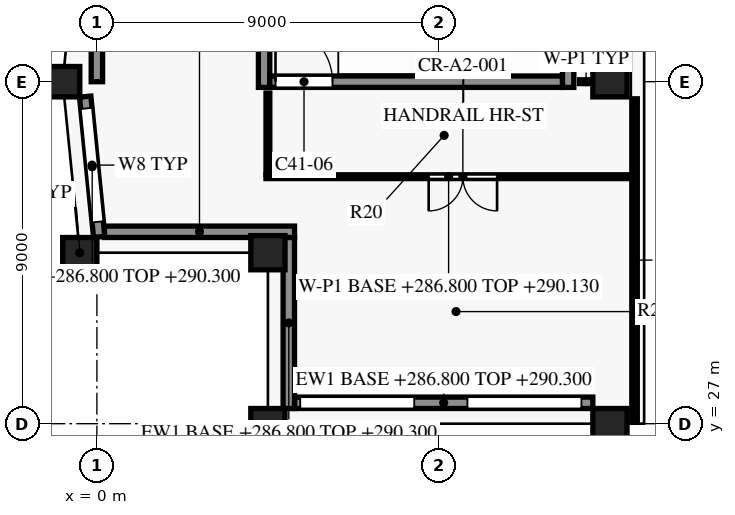
"""IFC4 building model, lengths in metres.
Left out: names, types, materials, properties, quantities, classifications, styles, units other than length and angle.
Written with IfcOpenShell. Run it as: python <this file> out.ifc"""

import sys

from ifc_helpers import new_model, si_unit, direction, frame, frame_2d, origin, origin_2d, place, context, subcontext, project, spatial, rectangle, extrude, element, fill, save


model = new_model("IFC4")
c1 = context("Model", 3, precision=1e-05, world=origin(), true_north=direction((0.0, 1.0)))
c2 = subcontext(c1, "Body", "Model", "MODEL_VIEW")
j1 = project(units=[si_unit("LENGTHUNIT", "METRE"), si_unit("PLANEANGLEUNIT", "RADIAN")], contexts=[c1])
p1 = place(None, origin())
s1 = spatial("IfcSite", under=j1, at=p1, CompositionType="ELEMENT")
p2 = place(p1, origin())
s2 = spatial("IfcBuilding", under=s1, at=p2, CompositionType="ELEMENT")
p3 = place(p2, frame((0.0, 0.0, 286.8)))
s3 = spatial("IfcBuildingStorey", under=s2, at=p3, CompositionType="ELEMENT", Elevation=286.8)
for number, where, z_axis, x_axis in (
    (1, (4.5, 27.0, 0.0), (0.0, 0.0, 1.0), (1.0, 0.0, 0.0)),
    (2, (13.5, 27.0, 0.0), (0.0, 0.0, 1.0), (1.0, 0.0, 0.0)),
    (3, (13.5, 36.0, 0.0), (0.0, 0.0, 1.0), (1.0, 0.0, 0.0)),
    (4, (-0.9, 36.0, 0.0), (0.0, 0.0, 1.0), (0.0, -1.0, 0.0)),
    (5, (-0.45, 31.5, 0.0), (0.0, 0.0, 1.0), (0.1, -0.995, 0.0)),
):
    element("IfcColumn", number, at=place(p3, frame(where, z_axis=z_axis, x_axis=x_axis)), inside=s3, PredefinedType="COLUMN", context=c2, shape_type="SweptSolid", body=[
        extrude(rectangle(XDim=0.9, YDim=0.8, at=origin_2d()), origin(), (0.0, 0.0, 1.0), 4.0),
    ])
p4 = place(p3, frame((4.5, 31.5, 0.0), z_axis=(0.0, 0.0, 1.0), x_axis=(1.0, 0.0, 0.0)))
e6 = element("IfcColumn", 6, at=p4, inside=s3, PredefinedType="COLUMN", context=c2, shape_type="SweptSolid", body=[
    extrude(rectangle(XDim=0.9, YDim=0.9, at=origin_2d()), origin(), (0.0, 0.0, 1.0), 4.0),
])
p5 = place(p3, frame((13.05, 27.55, 0.0), z_axis=(0.0, 0.0, 1.0), x_axis=(-1.0, 0.0, 0.0)))
e7 = element("IfcWall", 7, at=p5, inside=s3, PredefinedType="SOLIDWALL", context=c2, shape_type="SweptSolid", body=[
    extrude(rectangle(XDim=7.85, YDim=0.3, at=frame_2d((3.925, 0.0))), origin(), (0.0, 0.0, 1.0), 3.5),
])
p6 = place(p5, frame((0.3, 0.0, 0.9)))
e8 = element("IfcOpeningElement", 8, at=p6, cuts=e7, PredefinedType="OPENING", context=c2, shape_type="SweptSolid", body=[
    extrude(rectangle(XDim=3.0, YDim=1.8, at=frame_2d((1.5, 0.9))), frame((0.0, 0.16, 0.0), z_axis=(0.0, -1.0, 0.0), x_axis=(1.0, 0.0, 0.0)), (0.0, 0.0, 1.0), 0.32),
])
p7 = place(p5, frame((4.7, 0.0, 0.9)))
e9 = element("IfcOpeningElement", 9, at=p7, cuts=e7, PredefinedType="OPENING", context=c2, shape_type="SweptSolid", body=[
    extrude(rectangle(XDim=3.0, YDim=1.8, at=frame_2d((1.5, 0.9))), frame((0.0, 0.16, 0.0), z_axis=(0.0, -1.0, 0.0), x_axis=(1.0, 0.0, 0.0)), (0.0, 0.0, 1.0), 0.32),
])
p8 = place(p3, frame((0.061, 31.915, 0.0), z_axis=(0.0, 0.0, 1.0), x_axis=(-0.099549320092, 0.995032629048, 0.0)))
e10 = element("IfcWall", 10, at=p8, inside=s3, PredefinedType="SOLIDWALL", context=c2, shape_type="SweptSolid", body=[
    extrude(rectangle(XDim=3.71, YDim=0.3, at=frame_2d((1.855, 0.0))), origin(), (0.0, 0.0, 1.0), 3.5),
])
p9 = place(p8, frame((0.399, 0.0, 0.9)))
e11 = element("IfcOpeningElement", 11, at=p9, cuts=e10, PredefinedType="OPENING", context=c2, shape_type="SweptSolid", body=[
    extrude(rectangle(XDim=3.0, YDim=1.8, at=frame_2d((1.5, 0.9))), frame((0.0, 0.16, 0.0), z_axis=(0.0, -1.0, 0.0), x_axis=(1.0, 0.0, 0.0)), (0.0, 0.0, 1.0), 0.32),
])
p10 = place(p3, frame((5.2, 32.05, 0.0), z_axis=(0.0, 0.0, 1.0), x_axis=(-1.0, 0.0, 0.0)))
e12 = element("IfcWall", 12, at=p10, inside=s3, PredefinedType="SOLIDWALL", context=c2, shape_type="SweptSolid", body=[
    extrude(rectangle(XDim=5.0, YDim=0.3, at=frame_2d((2.5, 0.0))), origin(), (0.0, 0.0, 1.0), 3.5),
])
p11 = place(p3, frame((5.05, 27.4, 0.0), z_axis=(0.0, 0.0, 1.0), x_axis=(0.0, 1.0, 0.0)))
e13 = element("IfcWall", 13, at=p11, inside=s3, PredefinedType="SOLIDWALL", context=c2, shape_type="SweptSolid", body=[
    extrude(rectangle(XDim=4.502, YDim=0.3, at=frame_2d((2.251, 0.0))), origin(), (0.0, 0.0, 1.0), 3.5),
])
p12 = place(p3, frame((4.55, 36.0, 0.0), z_axis=(0.0, 0.0, 1.0), x_axis=(1.0, 0.0, 0.0)))
e14 = element("IfcWall", 14, at=p12, inside=s3, PredefinedType="SHEAR", context=c2, shape_type="SweptSolid", body=[
    extrude(rectangle(XDim=7.7, YDim=0.3, at=frame_2d((3.85, 0.0))), origin(), (0.0, 0.0, 1.0), 3.7),
])
p13 = place(p12, frame((0.15, 0.0, 0.0)))
e15 = element("IfcOpeningElement", 15, at=p13, cuts=e14, PredefinedType="OPENING", context=c2, shape_type="SweptSolid", body=[
    extrude(rectangle(XDim=1.5, YDim=2.2, at=frame_2d((0.75, 1.1))), frame((0.0, 0.16, 0.0), z_axis=(0.0, -1.0, 0.0), x_axis=(1.0, 0.0, 0.0)), (0.0, 0.0, 1.0), 0.32),
])
p14 = place(p3, frame((0.0, 36.0, 0.0), z_axis=(0.0, 0.0, 1.0), x_axis=(0.0, 1.0, 0.0)))
e16 = element("IfcWall", 16, at=p14, inside=s3, PredefinedType="SHEAR", context=c2, shape_type="SweptSolid", body=[
    extrude(rectangle(XDim=7.275, YDim=0.3, at=frame_2d((3.637, 0.0))), origin(), (0.0, 0.0, 1.0), 3.7),
])
p15 = place(p3, frame((4.4, 35.85, 0.0), z_axis=(0.0, 0.0, 1.0), x_axis=(0.0, 1.0, 0.0)))
e17 = element("IfcWall", 17, at=p15, inside=s3, PredefinedType="SHEAR", context=c2, shape_type="SweptSolid", body=[
    extrude(rectangle(XDim=3.75, YDim=0.3, at=frame_2d((1.875, 0.0))), origin(), (0.0, 0.0, 1.0), 3.7),
])
p16 = place(p3, frame((12.4, 35.85, 0.0), z_axis=(0.0, 0.0, 1.0), x_axis=(0.0, 1.0, 0.0)))
e18 = element("IfcWall", 18, at=p16, inside=s3, PredefinedType="SHEAR", context=c2, shape_type="SweptSolid", body=[
    extrude(rectangle(XDim=3.9, YDim=0.3, at=frame_2d((1.95, 0.0))), origin(), (0.0, 0.0, 1.0), 3.7),
])
p17 = place(p3, frame((14.06, 33.5, 0.0), z_axis=(0.0, 0.0, 1.0), x_axis=(-1.0, 0.0, 0.0)))
e19 = element("IfcWall", 19, at=p17, inside=s3, PredefinedType="PARTITIONING", context=c2, shape_type="SweptSolid", body=[
    extrude(rectangle(XDim=9.61, YDim=0.1, at=frame_2d((4.805, 0.0))), origin(), (0.0, 0.0, 1.0), 3.33),
])
p18 = place(p17, frame((3.53, 0.0, 0.0)))
e20 = element("IfcOpeningElement", 20, at=p18, cuts=e19, PredefinedType="OPENING", context=c2, shape_type="SweptSolid", body=[
    extrude(rectangle(XDim=1.8, YDim=2.1, at=frame_2d((0.9, 1.05))), frame((0.0, 0.06, 0.0), z_axis=(0.0, -1.0, 0.0), x_axis=(1.0, 0.0, 0.0)), (0.0, 0.0, 1.0), 0.12),
])
p19 = place(p3, frame((4.5, 33.55, 0.0), z_axis=(0.0, 0.0, 1.0), x_axis=(0.0, 1.0, 0.0)))
e21 = element("IfcWall", 21, at=p19, inside=s3, PredefinedType="PARTITIONING", context=c2, shape_type="SweptSolid", body=[
    extrude(rectangle(XDim=2.15, YDim=0.1, at=frame_2d((1.075, 0.0))), origin(), (0.0, 0.0, 1.0), 3.68),
])
p20 = place(p3, frame((12.7, 36.0, 0.0), z_axis=(0.0, 0.0, 1.0), x_axis=(1.0, 0.0, 0.0)))
e22 = element("IfcWall", 22, at=p20, inside=s3, PredefinedType="PARTITIONING", context=c2, shape_type="SweptSolid", body=[
    extrude(rectangle(XDim=0.345, YDim=0.1, at=frame_2d((0.172, 0.0))), origin(), (0.0, 0.0, 1.0), 3.68),
])
p21 = place(p6, origin())
e23 = element("IfcWindow", 23, at=p21, inside=s3, PartitioningType="SINGLE_PANEL", PredefinedType="WINDOW", context=c2, shape_type="SweptSolid", body=[
    extrude(rectangle(XDim=3.0, YDim=1.8, at=frame_2d((1.5, 0.9))), frame((0.0, 0.03, 0.0), z_axis=(0.0, -1.0, 0.0), x_axis=(1.0, 0.0, 0.0)), (0.0, 0.0, 1.0), 0.06),
])
fill(e8, e23)
p22 = place(p7, origin())
e24 = element("IfcWindow", 24, at=p22, inside=s3, PartitioningType="SINGLE_PANEL", PredefinedType="WINDOW", context=c2, shape_type="SweptSolid", body=[
    extrude(rectangle(XDim=3.0, YDim=1.8, at=frame_2d((1.5, 0.9))), frame((0.0, 0.03, 0.0), z_axis=(0.0, -1.0, 0.0), x_axis=(1.0, 0.0, 0.0)), (0.0, 0.0, 1.0), 0.06),
])
fill(e9, e24)
p23 = place(p9, origin())
e25 = element("IfcWindow", 25, at=p23, inside=s3, PartitioningType="SINGLE_PANEL", PredefinedType="WINDOW", context=c2, shape_type="SweptSolid", body=[
    extrude(rectangle(XDim=3.0, YDim=1.8, at=frame_2d((1.5, 0.9))), frame((0.0, 0.03, 0.0), z_axis=(0.0, -1.0, 0.0), x_axis=(1.0, 0.0, 0.0)), (0.0, 0.0, 1.0), 0.06),
])
fill(e11, e25)
p24 = place(p13, origin())
e26 = element("IfcDoor", 26, at=p24, inside=s3, OperationType="SINGLE_SWING_RIGHT", PredefinedType="DOOR", context=c2, shape_type="SweptSolid", body=[
    extrude(rectangle(XDim=1.5, YDim=2.2, at=frame_2d((0.75, 1.1))), frame((0.0, 0.025, 0.0), z_axis=(0.0, -1.0, 0.0), x_axis=(1.0, 0.0, 0.0)), (0.0, 0.0, 1.0), 0.05),
])
fill(e15, e26)
p25 = place(p18, origin())
e27 = element("IfcDoor", 27, at=p25, inside=s3, OperationType="DOUBLE_DOOR_SINGLE_SWING", PredefinedType="DOOR", context=c2, shape_type="SweptSolid", body=[
    extrude(rectangle(XDim=1.8, YDim=2.1, at=frame_2d((0.9, 1.05))), frame((0.0, 0.025, 0.0), z_axis=(0.0, -1.0, 0.0), x_axis=(1.0, 0.0, 0.0)), (0.0, 0.0, 1.0), 0.05),
])
fill(e20, e27)
save(model, sys.argv[1])
